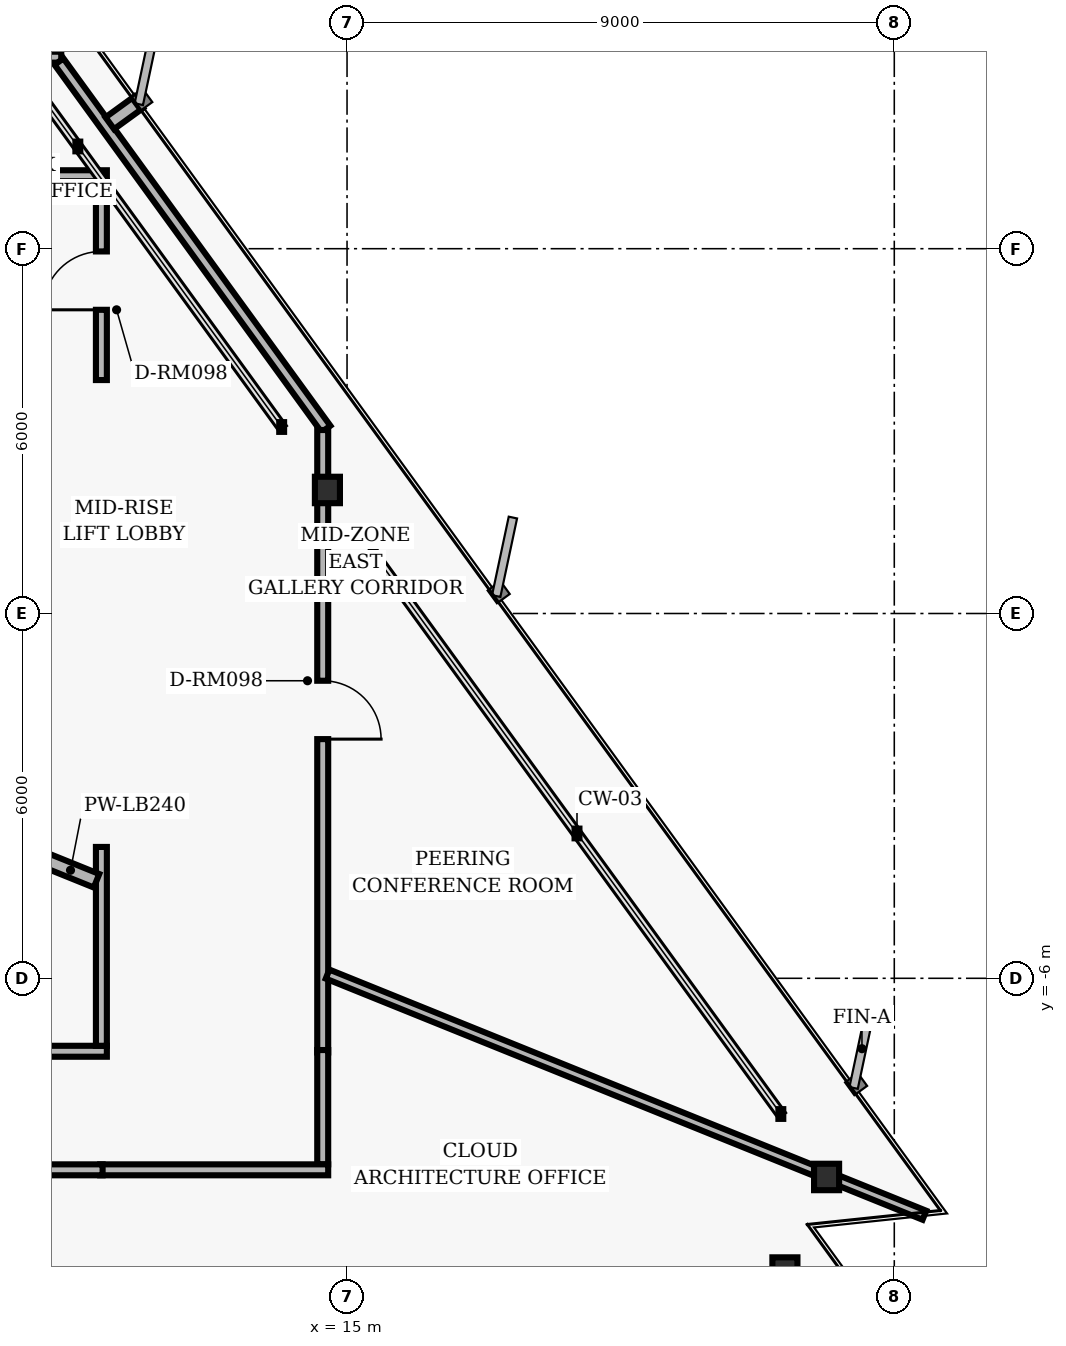
"""IFC4 building model, lengths in metres.
Left out: names, types, materials, properties, quantities, classifications, styles, units other than length and angle.
Written with IfcOpenShell. Run it as: python <this file> out.ifc"""

import sys

from ifc_helpers import new_model, si_unit, direction, frame, frame_2d, origin, origin_2d, place, context, subcontext, project, spatial, rectangle, i_section, extrude, element, fill, save


model = new_model("IFC4")
c1 = context("Model", 3, precision=1e-05, world=origin(), true_north=direction((0.0, 1.0)))
c2 = subcontext(c1, "Body", "Model", "MODEL_VIEW")
j1 = project(units=[si_unit("LENGTHUNIT", "METRE"), si_unit("PLANEANGLEUNIT", "RADIAN")], contexts=[c1])
p1 = place(None, origin())
s1 = spatial("IfcSite", under=j1, at=p1, CompositionType="ELEMENT")
p2 = place(p1, origin())
s2 = spatial("IfcBuilding", under=s1, at=p2, CompositionType="ELEMENT")
p3 = place(p2, frame((0.0, 0.0, 110.72)))
s3 = spatial("IfcBuildingStorey", under=s2, at=p3, CompositionType="ELEMENT", Elevation=110.72)
for number, where, z_axis, x_axis in (
    (1, (22.887, -9.268, 0.0), (0.0, 0.0, 1.0), (1.0, 0.0, 0.0)),
    (2, (14.677, 2.032, 0.0), (0.0, 0.0, 1.0), (1.0, 0.0, 0.0)),
    (3, (22.201, -10.807, 0.0), (0.0, 0.0, 1.0), (1.0, 0.0, 0.0)),
):
    element("IfcColumn", number, at=place(p3, frame(where, z_axis=z_axis, x_axis=x_axis)), inside=s3, PredefinedType="COLUMN", context=c2, shape_type="SweptSolid", body=[
        extrude(i_section(OverallWidth=0.412, OverallDepth=0.435, WebThickness=0.036, FlangeThickness=0.057, FilletRadius=0.022, at=origin_2d()), origin(), (0.0, 0.0, 1.0), 3.04),
    ])
p4 = place(p3, frame((-6.52, 9.15, 0.0), z_axis=(0.0, 0.0, 1.0), x_axis=(1.0, 0.0, 0.0)))
e4 = element("IfcWall", 4, at=p4, inside=s3, PredefinedType="PARTITIONING", context=c2, shape_type="SweptSolid", body=[
    extrude(rectangle(XDim=16.82, YDim=0.18, at=frame_2d((8.41, 0.0))), origin(), (0.0, 0.0, 1.0), 2.763),
])
p5 = place(p4, frame((10.898, 0.0, 0.0)))
e5 = element("IfcOpeningElement", 5, at=p5, cuts=e4, PredefinedType="OPENING", context=c2, shape_type="SweptSolid", body=[
    extrude(rectangle(XDim=0.96, YDim=2.02, at=frame_2d((0.48, 1.01))), frame((0.0, 0.1, 0.0), z_axis=(0.0, -1.0, 0.0), x_axis=(1.0, 0.0, 0.0)), (0.0, 0.0, 1.0), 0.2),
])
p6 = place(p4, frame((2.749, 0.0, 0.0)))
e6 = element("IfcOpeningElement", 6, at=p6, cuts=e4, PredefinedType="OPENING", context=c2, shape_type="SweptSolid", body=[
    extrude(rectangle(XDim=0.96, YDim=2.02, at=frame_2d((0.48, 1.01))), frame((0.0, 0.1, 0.0), z_axis=(0.0, -1.0, 0.0), x_axis=(1.0, 0.0, 0.0)), (0.0, 0.0, 1.0), 0.2),
])
p7 = place(p3, frame((10.263, 9.077, 0.0), z_axis=(0.0, 0.0, 1.0), x_axis=(0.587780951295, -0.809020119215, 0.0)))
e7 = element("IfcWall", 7, at=p7, inside=s3, PredefinedType="PARTITIONING", context=c2, shape_type="SweptSolid", body=[
    extrude(rectangle(XDim=7.469, YDim=0.18, at=frame_2d((3.734, 0.0))), origin(), (0.0, 0.0, 1.0), 2.763),
])
p8 = place(p3, frame((14.6, 3.018, 0.0), z_axis=(0.0, 0.0, 1.0), x_axis=(0.0, -1.0, 0.0)))
e8 = element("IfcWall", 8, at=p8, inside=s3, PredefinedType="PARTITIONING", context=c2, shape_type="SweptSolid", body=[
    extrude(rectangle(XDim=10.238, YDim=0.18, at=frame_2d((5.119, 0.0))), origin(), (0.0, 0.0, 1.0), 2.763),
])
p9 = place(p8, frame((4.124, 0.0, 0.0)))
e9 = element("IfcOpeningElement", 9, at=p9, cuts=e8, PredefinedType="OPENING", context=c2, shape_type="SweptSolid", body=[
    extrude(rectangle(XDim=0.96, YDim=2.02, at=frame_2d((0.48, 1.01))), frame((0.0, 0.1, 0.0), z_axis=(0.0, -1.0, 0.0), x_axis=(1.0, 0.0, 0.0)), (0.0, 0.0, 1.0), 0.2),
])
p10 = place(p3, frame((14.6, -7.18, 0.0), z_axis=(0.0, 0.0, 1.0), x_axis=(0.0, -1.0, 0.0)))
e10 = element("IfcWall", 10, at=p10, inside=s3, PredefinedType="PARTITIONING", context=c2, shape_type="SweptSolid", body=[
    extrude(rectangle(XDim=1.88, YDim=0.18, at=frame_2d((0.94, 0.0))), origin(), (0.0, 0.0, 1.0), 2.763),
])
p11 = place(p3, frame((14.69, -9.15, 0.0), z_axis=(0.0, 0.0, 1.0), x_axis=(-1.0, 0.0, 0.0)))
e11 = element("IfcWall", 11, at=p11, inside=s3, PredefinedType="PARTITIONING", context=c2, shape_type="SweptSolid", body=[
    extrude(rectangle(XDim=3.75, YDim=0.18, at=frame_2d((1.875, 0.0))), origin(), (0.0, 0.0, 1.0), 2.33),
])
p12 = place(p3, frame((10.98, -9.15, 0.0), z_axis=(0.0, 0.0, 1.0), x_axis=(-1.0, 0.0, 0.0)))
e12 = element("IfcWall", 12, at=p12, inside=s3, PredefinedType="PARTITIONING", context=c2, shape_type="SweptSolid", body=[
    extrude(rectangle(XDim=17.5, YDim=0.18, at=frame_2d((8.75, 0.0))), origin(), (0.0, 0.0, 1.0), 2.33),
])
p13 = place(p12, frame((13.145, 0.0, 0.0)))
e13 = element("IfcOpeningElement", 13, at=p13, cuts=e12, PredefinedType="OPENING", context=c2, shape_type="SweptSolid", body=[
    extrude(rectangle(XDim=0.96, YDim=2.02, at=frame_2d((0.48, 1.01))), frame((0.0, 0.1, 0.0), z_axis=(0.0, -1.0, 0.0), x_axis=(1.0, 0.0, 0.0)), (0.0, 0.0, 1.0), 0.2),
])
p14 = place(p12, frame((4.655, 0.0, 0.0)))
e14 = element("IfcOpeningElement", 14, at=p14, cuts=e12, PredefinedType="OPENING", context=c2, shape_type="SweptSolid", body=[
    extrude(rectangle(XDim=0.96, YDim=2.02, at=frame_2d((0.48, 1.01))), frame((0.0, 0.1, 0.0), z_axis=(0.0, -1.0, 0.0), x_axis=(1.0, 0.0, 0.0)), (0.0, 0.0, 1.0), 0.2),
])
p15 = place(p3, frame((5.53, -7.2, 0.0), z_axis=(0.0, 0.0, 1.0), x_axis=(1.0, 0.0, 0.0)))
e15 = element("IfcWall", 15, at=p15, inside=s3, PredefinedType="PARTITIONING", context=c2, shape_type="SweptSolid", body=[
    extrude(rectangle(XDim=5.52, YDim=0.18, at=frame_2d((2.76, 0.0))), origin(), (0.0, 0.0, 1.0), 2.33),
])
p16 = place(p15, frame((2.25, 0.0, 0.0)))
e16 = element("IfcOpeningElement", 16, at=p16, cuts=e15, PredefinedType="OPENING", context=c2, shape_type="SweptSolid", body=[
    extrude(rectangle(XDim=1.02, YDim=2.02, at=frame_2d((0.51, 1.01))), frame((0.0, 0.1, 0.0), z_axis=(0.0, -1.0, 0.0), x_axis=(1.0, 0.0, 0.0)), (0.0, 0.0, 1.0), 0.2),
])
p17 = place(p3, frame((10.96, -7.11, 0.0), z_axis=(0.0, 0.0, 1.0), x_axis=(0.0, 1.0, 0.0)))
e17 = element("IfcWall", 17, at=p17, inside=s3, PredefinedType="PARTITIONING", context=c2, shape_type="SweptSolid", body=[
    extrude(rectangle(XDim=3.271, YDim=0.18, at=frame_2d((1.635, 0.0))), origin(), (0.0, 0.0, 1.0), 2.763),
])
p18 = place(p3, frame((10.96, 3.84, 0.0), z_axis=(0.0, 0.0, 1.0), x_axis=(0.0, 1.0, 0.0)))
e18 = element("IfcWall", 18, at=p18, inside=s3, PredefinedType="PARTITIONING", context=c2, shape_type="SweptSolid", body=[
    extrude(rectangle(XDim=3.271, YDim=0.18, at=frame_2d((1.635, 0.0))), origin(), (0.0, 0.0, 1.0), 2.763),
])
p19 = place(p18, frame((1.155, 0.0, 0.0)))
e19 = element("IfcOpeningElement", 19, at=p19, cuts=e18, PredefinedType="OPENING", context=c2, shape_type="SweptSolid", body=[
    extrude(rectangle(XDim=0.96, YDim=2.02, at=frame_2d((0.48, 1.01))), frame((0.0, 0.1, 0.0), z_axis=(0.0, -1.0, 0.0), x_axis=(1.0, 0.0, 0.0)), (0.0, 0.0, 1.0), 0.2),
])
p20 = place(p3, frame((11.05, 7.2, 0.0), z_axis=(0.0, 0.0, 1.0), x_axis=(-1.0, 0.0, 0.0)))
e20 = element("IfcWall", 20, at=p20, inside=s3, PredefinedType="PARTITIONING", context=c2, shape_type="SweptSolid", body=[
    extrude(rectangle(XDim=5.12, YDim=0.18, at=frame_2d((2.56, 0.0))), origin(), (0.0, 0.0, 1.0), 2.763),
])
p21 = place(p3, frame((10.024, -4.05, 0.0), z_axis=(0.0, 0.0, 1.0), x_axis=(0.927194137639, -0.374581140912, 0.0)))
e21 = element("IfcWall", 21, at=p21, inside=s3, PredefinedType="PARTITIONING", context=c2, shape_type="SweptSolid", body=[
    extrude(rectangle(XDim=0.923, YDim=0.24, at=frame_2d((0.461, 0.0))), origin(), (0.0, 0.0, 1.0), 2.763),
])
p22 = place(p3, frame((14.68, -5.931, 0.0), z_axis=(0.0, 0.0, 1.0), x_axis=(0.927187622353, -0.374597267682, 0.0)))
e22 = element("IfcWall", 22, at=p22, inside=s3, PredefinedType="PARTITIONING", context=c2, shape_type="SweptSolid", body=[
    extrude(rectangle(XDim=10.586, YDim=0.16, at=frame_2d((5.293, 0.0))), origin(), (0.0, 0.0, 1.0), 2.132),
])
p23 = place(p3, frame((11.098, 8.063, 0.0), z_axis=(0.0, 0.0, 1.0), x_axis=(0.809093866449, 0.587679432408, 0.0)))
e23 = element("IfcWall", 23, at=p23, inside=s3, PredefinedType="PARTITIONING", context=c2, shape_type="SweptSolid", body=[
    extrude(rectangle(XDim=0.59, YDim=0.24, at=frame_2d((0.295, 0.0))), origin(), (0.0, 0.0, 1.0), 2.763),
])
p24 = place(p9, origin())
e24 = element("IfcDoor", 24, at=p24, inside=s3, OperationType="SINGLE_SWING_RIGHT", PredefinedType="DOOR", context=c2, shape_type="SweptSolid", body=[
    extrude(rectangle(XDim=0.96, YDim=2.02, at=frame_2d((0.48, 1.01))), frame((0.0, 0.025, 0.0), z_axis=(0.0, -1.0, 0.0), x_axis=(1.0, 0.0, 0.0)), (0.0, 0.0, 1.0), 0.05),
])
fill(e9, e24)
p25 = place(p19, origin())
e25 = element("IfcDoor", 25, at=p25, inside=s3, OperationType="SINGLE_SWING_LEFT", PredefinedType="DOOR", context=c2, shape_type="SweptSolid", body=[
    extrude(rectangle(XDim=0.96, YDim=2.02, at=frame_2d((0.48, 1.01))), frame((0.0, 0.025, 0.0), z_axis=(0.0, -1.0, 0.0), x_axis=(1.0, 0.0, 0.0)), (0.0, 0.0, 1.0), 0.05),
])
fill(e19, e25)
save(model, sys.argv[1])
